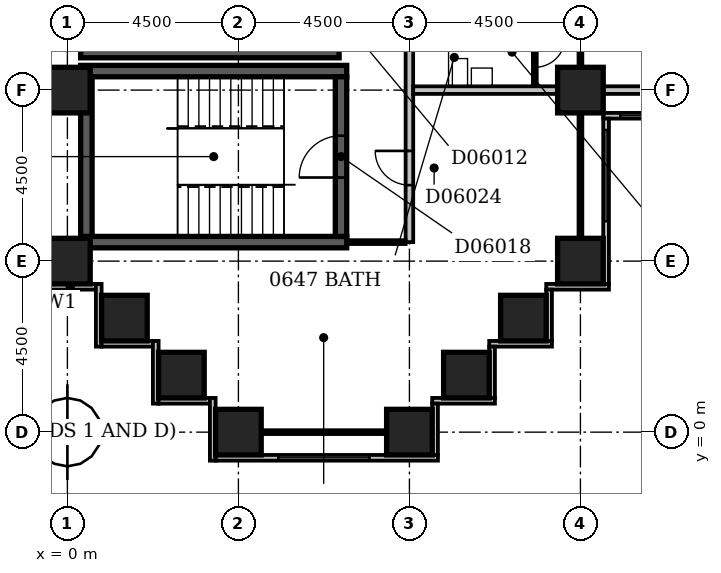
"""IFC4 building model, lengths in metres.
Left out: names, types, materials, properties, quantities, classifications, styles, units other than length and angle.
Written with IfcOpenShell. Run it as: python <this file> out.ifc"""

import sys

from ifc_helpers import new_model, si_unit, direction, frame, frame_2d, origin, origin_2d, place, context, subcontext, project, spatial, rectangle, extrude, element, fill, save


model = new_model("IFC4")
c1 = context("Model", 3, precision=1e-05, world=origin(), true_north=direction((0.0, 1.0)))
c2 = subcontext(c1, "Body", "Model", "MODEL_VIEW")
j1 = project(units=[si_unit("LENGTHUNIT", "METRE"), si_unit("PLANEANGLEUNIT", "RADIAN")], contexts=[c1])
p1 = place(None, origin())
s1 = spatial("IfcSite", under=j1, at=p1, CompositionType="ELEMENT")
p2 = place(p1, origin())
s2 = spatial("IfcBuilding", under=s1, at=p2, CompositionType="ELEMENT")
p3 = place(p2, frame((0.0, 0.0, 32.6)))
s3 = spatial("IfcBuildingStorey", under=s2, at=p3, CompositionType="ELEMENT", Elevation=32.6)
for number, where, z_axis, x_axis in (
    (1, (0.35, 5.0, -0.3), (0.0, 0.0, 1.0), (1.0, 0.0, 0.0)),
    (2, (0.35, 9.5, -0.3), (0.0, 0.0, 1.0), (1.0, 0.0, 0.0)),
):
    element("IfcWall", number, at=place(p3, frame(where, z_axis=z_axis, x_axis=x_axis)), inside=s3, PredefinedType="SHEAR", context=c2, shape_type="SweptSolid", body=[
        extrude(rectangle(XDim=7.0, YDim=0.3, at=frame_2d((3.5, 0.0))), origin(), (0.0, 0.0, 1.0), 3.6),
    ])
p4 = place(p3, frame((0.35, 10.0, -0.3), z_axis=(0.0, 0.0, 1.0), x_axis=(1.0, 0.0, 0.0)))
e3 = element("IfcWall", 3, at=p4, inside=s3, PredefinedType="SHEAR", context=c2, shape_type="SweptSolid", body=[
    extrude(rectangle(XDim=6.8, YDim=0.3, at=frame_2d((3.4, 0.0))), origin(), (0.0, 0.0, 1.0), 3.6),
])
p5 = place(p3, frame((0.5, 5.15, -0.3), z_axis=(0.0, 0.0, 1.0), x_axis=(0.0, 1.0, 0.0)))
e4 = element("IfcWall", 4, at=p5, inside=s3, PredefinedType="SHEAR", context=c2, shape_type="SweptSolid", body=[
    extrude(rectangle(XDim=4.2, YDim=0.3, at=frame_2d((2.1, 0.0))), origin(), (0.0, 0.0, 1.0), 3.6),
])
p6 = place(p3, frame((7.2, 5.15, -0.3), z_axis=(0.0, 0.0, 1.0), x_axis=(0.0, 1.0, 0.0)))
e5 = element("IfcWall", 5, at=p6, inside=s3, PredefinedType="SHEAR", context=c2, shape_type="SweptSolid", body=[
    extrude(rectangle(XDim=4.2, YDim=0.3, at=frame_2d((2.1, 0.0))), origin(), (0.0, 0.0, 1.0), 3.6),
])
p7 = place(p6, frame((1.55, 0.0, 0.3)))
e6 = element("IfcOpeningElement", 6, at=p7, cuts=e5, PredefinedType="OPENING", context=c2, shape_type="SweptSolid", body=[
    extrude(rectangle(XDim=1.1, YDim=2.1, at=frame_2d((0.55, 1.05))), frame((0.0, 0.162, 0.0), z_axis=(0.0, -1.0, 0.0), x_axis=(1.0, 0.0, 0.0)), (0.0, 0.0, 1.0), 0.324),
])
for number, where, z_axis, x_axis in (
    (7, (4.5, 0.0, -0.3), (0.0, 0.0, 1.0), (1.0, 0.0, 0.0)),
    (8, (9.0, 0.0, -0.3), (0.0, 0.0, 1.0), (1.0, 0.0, 0.0)),
    (9, (3.0, 1.5, -0.3), (0.0, 0.0, 1.0), (1.0, 0.0, 0.0)),
    (10, (10.5, 1.5, -0.3), (0.0, 0.0, 1.0), (1.0, 0.0, 0.0)),
    (11, (1.5, 3.0, -0.3), (0.0, 0.0, 1.0), (1.0, 0.0, 0.0)),
    (12, (12.0, 3.0, -0.3), (0.0, 0.0, 1.0), (1.0, 0.0, 0.0)),
    (13, (0.0, 4.5, -0.3), (0.0, 0.0, 1.0), (1.0, 0.0, 0.0)),
    (14, (13.5, 4.5, -0.3), (0.0, 0.0, 1.0), (1.0, 0.0, 0.0)),
    (15, (0.0, 9.0, -0.3), (0.0, 0.0, 1.0), (1.0, 0.0, 0.0)),
    (16, (13.5, 9.0, -0.3), (0.0, 0.0, 1.0), (1.0, 0.0, 0.0)),
):
    element("IfcColumn", number, at=place(p3, frame(where, z_axis=z_axis, x_axis=x_axis)), inside=s3, PredefinedType="COLUMN", context=c2, shape_type="SweptSolid", body=[
        extrude(rectangle(XDim=1.2, YDim=1.2, at=origin_2d()), origin(), (0.0, 0.0, 1.0), 3.6),
    ])
p8 = place(p3, frame((9.675, -0.6, 0.0), z_axis=(0.0, 0.0, 1.0), x_axis=(0.0, 1.0, 0.0)))
e17 = element("IfcWall", 17, at=p8, inside=s3, PredefinedType="STANDARD", context=c2, shape_type="SweptSolid", body=[
    extrude(rectangle(XDim=1.35, YDim=0.15, at=frame_2d((0.675, 0.0))), origin(), (0.0, 0.0, 1.0), 2.7),
])
p9 = place(p3, frame((9.6, 0.825, 0.0), z_axis=(0.0, 0.0, 1.0), x_axis=(1.0, 0.0, 0.0)))
e18 = element("IfcWall", 18, at=p9, inside=s3, PredefinedType="STANDARD", context=c2, shape_type="SweptSolid", body=[
    extrude(rectangle(XDim=1.65, YDim=0.15, at=frame_2d((0.825, 0.0))), origin(), (0.0, 0.0, 1.0), 2.7),
])
p10 = place(p3, frame((11.175, 0.9, 0.0), z_axis=(0.0, 0.0, 1.0), x_axis=(0.0, 1.0, 0.0)))
e19 = element("IfcWall", 19, at=p10, inside=s3, PredefinedType="STANDARD", context=c2, shape_type="SweptSolid", body=[
    extrude(rectangle(XDim=1.35, YDim=0.15, at=frame_2d((0.675, 0.0))), origin(), (0.0, 0.0, 1.0), 2.7),
])
p11 = place(p3, frame((11.1, 2.325, 0.0), z_axis=(0.0, 0.0, 1.0), x_axis=(1.0, 0.0, 0.0)))
e20 = element("IfcWall", 20, at=p11, inside=s3, PredefinedType="STANDARD", context=c2, shape_type="SweptSolid", body=[
    extrude(rectangle(XDim=1.65, YDim=0.15, at=frame_2d((0.825, 0.0))), origin(), (0.0, 0.0, 1.0), 2.7),
])
p12 = place(p3, frame((12.675, 2.4, 0.0), z_axis=(0.0, 0.0, 1.0), x_axis=(0.0, 1.0, 0.0)))
e21 = element("IfcWall", 21, at=p12, inside=s3, PredefinedType="STANDARD", context=c2, shape_type="SweptSolid", body=[
    extrude(rectangle(XDim=1.35, YDim=0.15, at=frame_2d((0.675, 0.0))), origin(), (0.0, 0.0, 1.0), 2.7),
])
p13 = place(p3, frame((12.6, 3.825, 0.0), z_axis=(0.0, 0.0, 1.0), x_axis=(1.0, 0.0, 0.0)))
e22 = element("IfcWall", 22, at=p13, inside=s3, PredefinedType="STANDARD", context=c2, shape_type="SweptSolid", body=[
    extrude(rectangle(XDim=1.65, YDim=0.15, at=frame_2d((0.825, 0.0))), origin(), (0.0, 0.0, 1.0), 2.7),
])
p14 = place(p3, frame((14.175, 3.9, 0.0), z_axis=(0.0, 0.0, 1.0), x_axis=(0.0, 1.0, 0.0)))
e23 = element("IfcWall", 23, at=p14, inside=s3, PredefinedType="STANDARD", context=c2, shape_type="SweptSolid", body=[
    extrude(rectangle(XDim=4.35, YDim=0.15, at=frame_2d((2.175, 0.0))), origin(), (0.0, 0.0, 1.0), 2.7),
])
p15 = place(p14, frame((1.65, 0.0, 0.6)))
e24 = element("IfcOpeningElement", 24, at=p15, cuts=e23, PredefinedType="OPENING", context=c2, shape_type="SweptSolid", body=[
    extrude(rectangle(XDim=2.4, YDim=1.8, at=frame_2d((1.2, 0.9))), frame((0.0, 0.087, 0.0), z_axis=(0.0, -1.0, 0.0), x_axis=(1.0, 0.0, 0.0)), (0.0, 0.0, 1.0), 0.174),
])
p16 = place(p3, frame((14.1, 8.325, 0.0), z_axis=(0.0, 0.0, 1.0), x_axis=(1.0, 0.0, 0.0)))
e25 = element("IfcWall", 25, at=p16, inside=s3, PredefinedType="STANDARD", context=c2, shape_type="SweptSolid", body=[
    extrude(rectangle(XDim=4.65, YDim=0.15, at=frame_2d((2.325, 0.0))), origin(), (0.0, 0.0, 1.0), 2.7),
])
p17 = place(p16, frame((0.45, 0.0, 0.6)))
e26 = element("IfcOpeningElement", 26, at=p17, cuts=e25, PredefinedType="OPENING", context=c2, shape_type="SweptSolid", body=[
    extrude(rectangle(XDim=2.4, YDim=1.8, at=frame_2d((1.2, 0.9))), frame((0.0, 0.087, 0.0), z_axis=(0.0, -1.0, 0.0), x_axis=(1.0, 0.0, 0.0)), (0.0, 0.0, 1.0), 0.174),
])
p18 = place(p3, frame((-0.6, 3.825, 0.0), z_axis=(0.0, 0.0, 1.0), x_axis=(1.0, 0.0, 0.0)))
e27 = element("IfcWall", 27, at=p18, inside=s3, PredefinedType="STANDARD", context=c2, shape_type="SweptSolid", body=[
    extrude(rectangle(XDim=1.35, YDim=0.15, at=frame_2d((0.675, 0.0))), origin(), (0.0, 0.0, 1.0), 2.7),
])
p19 = place(p3, frame((0.825, 3.9, 0.0), z_axis=(0.0, 0.0, 1.0), x_axis=(0.0, -1.0, 0.0)))
e28 = element("IfcWall", 28, at=p19, inside=s3, PredefinedType="STANDARD", context=c2, shape_type="SweptSolid", body=[
    extrude(rectangle(XDim=1.65, YDim=0.15, at=frame_2d((0.825, 0.0))), origin(), (0.0, 0.0, 1.0), 2.7),
])
p20 = place(p3, frame((0.9, 2.325, 0.0), z_axis=(0.0, 0.0, 1.0), x_axis=(1.0, 0.0, 0.0)))
e29 = element("IfcWall", 29, at=p20, inside=s3, PredefinedType="STANDARD", context=c2, shape_type="SweptSolid", body=[
    extrude(rectangle(XDim=1.35, YDim=0.15, at=frame_2d((0.675, 0.0))), origin(), (0.0, 0.0, 1.0), 2.7),
])
p21 = place(p3, frame((2.325, 2.4, 0.0), z_axis=(0.0, 0.0, 1.0), x_axis=(0.0, -1.0, 0.0)))
e30 = element("IfcWall", 30, at=p21, inside=s3, PredefinedType="STANDARD", context=c2, shape_type="SweptSolid", body=[
    extrude(rectangle(XDim=1.65, YDim=0.15, at=frame_2d((0.825, 0.0))), origin(), (0.0, 0.0, 1.0), 2.7),
])
p22 = place(p3, frame((2.4, 0.825, 0.0), z_axis=(0.0, 0.0, 1.0), x_axis=(1.0, 0.0, 0.0)))
e31 = element("IfcWall", 31, at=p22, inside=s3, PredefinedType="STANDARD", context=c2, shape_type="SweptSolid", body=[
    extrude(rectangle(XDim=1.35, YDim=0.15, at=frame_2d((0.675, 0.0))), origin(), (0.0, 0.0, 1.0), 2.7),
])
p23 = place(p3, frame((3.825, 0.9, 0.0), z_axis=(0.0, 0.0, 1.0), x_axis=(0.0, -1.0, 0.0)))
e32 = element("IfcWall", 32, at=p23, inside=s3, PredefinedType="STANDARD", context=c2, shape_type="SweptSolid", body=[
    extrude(rectangle(XDim=1.65, YDim=0.15, at=frame_2d((0.825, 0.0))), origin(), (0.0, 0.0, 1.0), 2.7),
])
p24 = place(p3, frame((3.9, -0.675, 0.0), z_axis=(0.0, 0.0, 1.0), x_axis=(1.0, 0.0, 0.0)))
e33 = element("IfcWall", 33, at=p24, inside=s3, PredefinedType="STANDARD", context=c2, shape_type="SweptSolid", body=[
    extrude(rectangle(XDim=5.85, YDim=0.15, at=frame_2d((2.925, 0.0))), origin(), (0.0, 0.0, 1.0), 2.7),
])
p25 = place(p24, frame((1.65, 0.0, 0.6)))
e34 = element("IfcOpeningElement", 34, at=p25, cuts=e33, PredefinedType="OPENING", context=c2, shape_type="SweptSolid", body=[
    extrude(rectangle(XDim=2.4, YDim=1.8, at=frame_2d((1.2, 0.9))), frame((0.0, 0.087, 0.0), z_axis=(0.0, -1.0, 0.0), x_axis=(1.0, 0.0, 0.0)), (0.0, 0.0, 1.0), 0.174),
])
p26 = place(p3, frame((5.1, 0.0, 0.0), z_axis=(0.0, 0.0, 1.0), x_axis=(1.0, 0.0, 0.0)))
e35 = element("IfcWall", 35, at=p26, inside=s3, PredefinedType="PARTITIONING", context=c2, shape_type="SweptSolid", body=[
    extrude(rectangle(XDim=3.3, YDim=0.1, at=frame_2d((1.65, 0.0))), origin(), (0.0, 0.0, 1.0), 2.7),
])
p27 = place(p3, frame((0.0, 4.4, 0.0), z_axis=(0.0, 0.0, 1.0), x_axis=(0.0, 1.0, 0.0)))
e36 = element("IfcWall", 36, at=p27, inside=s3, PredefinedType="PARTITIONING", context=c2, shape_type="SweptSolid", body=[
    extrude(rectangle(XDim=0.7, YDim=0.1, at=frame_2d((0.35, 0.0))), origin(), (0.0, 0.0, 1.0), 2.7),
])
p28 = place(p3, frame((7.349, 5.0, 0.0), z_axis=(0.0, 0.0, 1.0), x_axis=(1.0, 0.0, 0.0)))
e37 = element("IfcWall", 37, at=p28, inside=s3, PredefinedType="PARTITIONING", context=c2, shape_type="SweptSolid", body=[
    extrude(rectangle(XDim=1.551, YDim=0.1, at=frame_2d((0.775, 0.0))), origin(), (0.0, 0.0, 1.0), 3.3),
])
p29 = place(p3, frame((9.0, 5.0, 0.0), z_axis=(0.0, 0.0, 1.0), x_axis=(0.0, 1.0, 0.0)))
e38 = element("IfcWall", 38, at=p29, inside=s3, PredefinedType="PARTITIONING", context=c2, shape_type="SweptSolid", body=[
    extrude(rectangle(XDim=44.5, YDim=0.2, at=frame_2d((22.25, 0.0))), origin(), (0.0, 0.0, 1.0), 3.3),
])
p30 = place(p29, frame((24.7, 0.0, 0.0)))
e39 = element("IfcOpeningElement", 39, at=p30, cuts=e38, PredefinedType="OPENING", context=c2, shape_type="SweptSolid", body=[
    extrude(rectangle(XDim=1.0, YDim=2.1, at=frame_2d((0.5, 1.05))), frame((0.0, 0.112, 0.0), z_axis=(0.0, -1.0, 0.0), x_axis=(1.0, 0.0, 0.0)), (0.0, 0.0, 1.0), 0.224),
])
p31 = place(p29, frame((13.3, 0.0, 0.0)))
e40 = element("IfcOpeningElement", 40, at=p31, cuts=e38, PredefinedType="OPENING", context=c2, shape_type="SweptSolid", body=[
    extrude(rectangle(XDim=1.0, YDim=2.1, at=frame_2d((0.5, 1.05))), frame((0.0, 0.112, 0.0), z_axis=(0.0, -1.0, 0.0), x_axis=(1.0, 0.0, 0.0)), (0.0, 0.0, 1.0), 0.224),
])
p32 = place(p29, frame((10.45, 0.0, 0.0)))
e41 = element("IfcOpeningElement", 41, at=p32, cuts=e38, PredefinedType="OPENING", context=c2, shape_type="SweptSolid", body=[
    extrude(rectangle(XDim=1.0, YDim=2.1, at=frame_2d((0.5, 1.05))), frame((0.0, 0.112, 0.0), z_axis=(0.0, -1.0, 0.0), x_axis=(1.0, 0.0, 0.0)), (0.0, 0.0, 1.0), 0.224),
])
p33 = place(p29, frame((5.95, 0.0, 0.0)))
e42 = element("IfcOpeningElement", 42, at=p33, cuts=e38, PredefinedType="OPENING", context=c2, shape_type="SweptSolid", body=[
    extrude(rectangle(XDim=1.0, YDim=2.1, at=frame_2d((0.5, 1.05))), frame((0.0, 0.112, 0.0), z_axis=(0.0, -1.0, 0.0), x_axis=(1.0, 0.0, 0.0)), (0.0, 0.0, 1.0), 0.224),
])
p34 = place(p29, frame((37.25, 0.0, 0.0)))
e43 = element("IfcOpeningElement", 43, at=p34, cuts=e38, PredefinedType="OPENING", context=c2, shape_type="SweptSolid", body=[
    extrude(rectangle(XDim=0.9, YDim=2.1, at=frame_2d((0.45, 1.05))), frame((0.0, 0.112, 0.0), z_axis=(0.0, -1.0, 0.0), x_axis=(1.0, 0.0, 0.0)), (0.0, 0.0, 1.0), 0.224),
])
p35 = place(p29, frame((1.5, 0.0, 0.0)))
e44 = element("IfcOpeningElement", 44, at=p35, cuts=e38, PredefinedType="OPENING", context=c2, shape_type="SweptSolid", body=[
    extrude(rectangle(XDim=0.9, YDim=2.1, at=frame_2d((0.45, 1.05))), frame((0.0, 0.112, 0.0), z_axis=(0.0, -1.0, 0.0), x_axis=(1.0, 0.0, 0.0)), (0.0, 0.0, 1.0), 0.224),
])
p36 = place(p3, frame((13.5, 5.1, 0.0), z_axis=(0.0, 0.0, 1.0), x_axis=(0.0, 1.0, 0.0)))
e45 = element("IfcWall", 45, at=p36, inside=s3, PredefinedType="PARTITIONING", context=c2, shape_type="SweptSolid", body=[
    extrude(rectangle(XDim=3.3, YDim=0.1, at=frame_2d((1.65, 0.0))), origin(), (0.0, 0.0, 1.0), 2.7),
])
p37 = place(p3, frame((9.1, 9.0, 0.0), z_axis=(0.0, 0.0, 1.0), x_axis=(1.0, 0.0, 0.0)))
e46 = element("IfcWall", 46, at=p37, inside=s3, PredefinedType="PARTITIONING", context=c2, shape_type="SweptSolid", body=[
    extrude(rectangle(XDim=3.8, YDim=0.2, at=frame_2d((1.9, 0.0))), origin(), (0.0, 0.0, 1.0), 3.3),
])
p38 = place(p3, frame((14.1, 9.0, 0.0), z_axis=(0.0, 0.0, 1.0), x_axis=(1.0, 0.0, 0.0)))
e47 = element("IfcWall", 47, at=p38, inside=s3, PredefinedType="PARTITIONING", context=c2, shape_type="SweptSolid", body=[
    extrude(rectangle(XDim=3.3, YDim=0.2, at=frame_2d((1.65, 0.0))), origin(), (0.0, 0.0, 1.0), 2.7),
])
p39 = place(p3, frame((12.3, 9.1, 0.0), z_axis=(0.0, 0.0, 1.0), x_axis=(0.0, 1.0, 0.0)))
e48 = element("IfcWall", 48, at=p39, inside=s3, PredefinedType="PARTITIONING", context=c2, shape_type="SweptSolid", body=[
    extrude(rectangle(XDim=1.6, YDim=0.1, at=frame_2d((0.8, 0.0))), origin(), (0.0, 0.0, 1.0), 3.3),
])
p40 = place(p39, frame((0.5, 0.0, 0.0)))
e49 = element("IfcOpeningElement", 49, at=p40, cuts=e48, PredefinedType="OPENING", context=c2, shape_type="SweptSolid", body=[
    extrude(rectangle(XDim=0.8, YDim=2.1, at=frame_2d((0.4, 1.05))), frame((0.0, 0.062, 0.0), z_axis=(0.0, -1.0, 0.0), x_axis=(1.0, 0.0, 0.0)), (0.0, 0.0, 1.0), 0.124),
])
p41 = place(p3, frame((13.5, 9.6, 0.0), z_axis=(0.0, 0.0, 1.0), x_axis=(0.0, 1.0, 0.0)))
e50 = element("IfcWall", 50, at=p41, inside=s3, PredefinedType="PARTITIONING", context=c2, shape_type="SweptSolid", body=[
    extrude(rectangle(XDim=8.3, YDim=0.1, at=frame_2d((4.15, 0.0))), origin(), (0.0, 0.0, 1.0), 3.3),
])
p42 = place(p41, frame((5.7, 0.0, 0.0)))
e51 = element("IfcOpeningElement", 51, at=p42, cuts=e50, PredefinedType="OPENING", context=c2, shape_type="SweptSolid", body=[
    extrude(rectangle(XDim=0.9, YDim=2.1, at=frame_2d((0.45, 1.05))), frame((0.0, 0.062, 0.0), z_axis=(0.0, -1.0, 0.0), x_axis=(1.0, 0.0, 0.0)), (0.0, 0.0, 1.0), 0.124),
])
p43 = place(p41, frame((1.2, 0.0, 0.0)))
e52 = element("IfcOpeningElement", 52, at=p43, cuts=e50, PredefinedType="OPENING", context=c2, shape_type="SweptSolid", body=[
    extrude(rectangle(XDim=0.9, YDim=2.1, at=frame_2d((0.45, 1.05))), frame((0.0, 0.062, 0.0), z_axis=(0.0, -1.0, 0.0), x_axis=(1.0, 0.0, 0.0)), (0.0, 0.0, 1.0), 0.124),
])
p44 = place(p15, origin())
e53 = element("IfcWindow", 53, at=p44, inside=s3, PartitioningType="SINGLE_PANEL", PredefinedType="WINDOW", context=c2, shape_type="SweptSolid", body=[
    extrude(rectangle(XDim=2.4, YDim=1.8, at=frame_2d((1.2, 0.9))), frame((0.0, 0.03, 0.0), z_axis=(0.0, -1.0, 0.0), x_axis=(1.0, 0.0, 0.0)), (0.0, 0.0, 1.0), 0.06),
])
fill(e24, e53)
p45 = place(p17, origin())
e54 = element("IfcWindow", 54, at=p45, inside=s3, PartitioningType="SINGLE_PANEL", PredefinedType="WINDOW", context=c2, shape_type="SweptSolid", body=[
    extrude(rectangle(XDim=2.4, YDim=1.8, at=frame_2d((1.2, 0.9))), frame((0.0, 0.03, 0.0), z_axis=(0.0, -1.0, 0.0), x_axis=(1.0, 0.0, 0.0)), (0.0, 0.0, 1.0), 0.06),
])
fill(e26, e54)
p46 = place(p25, origin())
e55 = element("IfcWindow", 55, at=p46, inside=s3, PartitioningType="SINGLE_PANEL", PredefinedType="WINDOW", context=c2, shape_type="SweptSolid", body=[
    extrude(rectangle(XDim=2.4, YDim=1.8, at=frame_2d((1.2, 0.9))), frame((0.0, 0.03, 0.0), z_axis=(0.0, -1.0, 0.0), x_axis=(1.0, 0.0, 0.0)), (0.0, 0.0, 1.0), 0.06),
])
fill(e34, e55)
p47 = place(p7, origin())
e56 = element("IfcDoor", 56, at=p47, inside=s3, OperationType="SINGLE_SWING_LEFT", PredefinedType="DOOR", context=c2, shape_type="SweptSolid", body=[
    extrude(rectangle(XDim=1.1, YDim=2.1, at=frame_2d((0.55, 1.05))), frame((0.0, 0.025, 0.0), z_axis=(0.0, -1.0, 0.0), x_axis=(1.0, 0.0, 0.0)), (0.0, 0.0, 1.0), 0.05),
])
fill(e6, e56)
p48 = place(p35, frame((0.9, 0.0, 0.0), z_axis=(0.0, 0.0, 1.0), x_axis=(-1.0, 0.0, 0.0)))
e57 = element("IfcDoor", 57, at=p48, inside=s3, OperationType="SINGLE_SWING_LEFT", PredefinedType="DOOR", context=c2, shape_type="SweptSolid", body=[
    extrude(rectangle(XDim=0.9, YDim=2.1, at=frame_2d((0.45, 1.05))), frame((0.0, 0.025, 0.0), z_axis=(0.0, -1.0, 0.0), x_axis=(1.0, 0.0, 0.0)), (0.0, 0.0, 1.0), 0.05),
])
fill(e44, e57)
p49 = place(p40, origin())
e58 = element("IfcDoor", 58, at=p49, inside=s3, OperationType="SINGLE_SWING_RIGHT", PredefinedType="DOOR", context=c2, shape_type="SweptSolid", body=[
    extrude(rectangle(XDim=0.8, YDim=2.1, at=frame_2d((0.4, 1.05))), frame((0.0, 0.025, 0.0), z_axis=(0.0, -1.0, 0.0), x_axis=(1.0, 0.0, 0.0)), (0.0, 0.0, 1.0), 0.05),
])
fill(e49, e58)
save(model, sys.argv[1])
